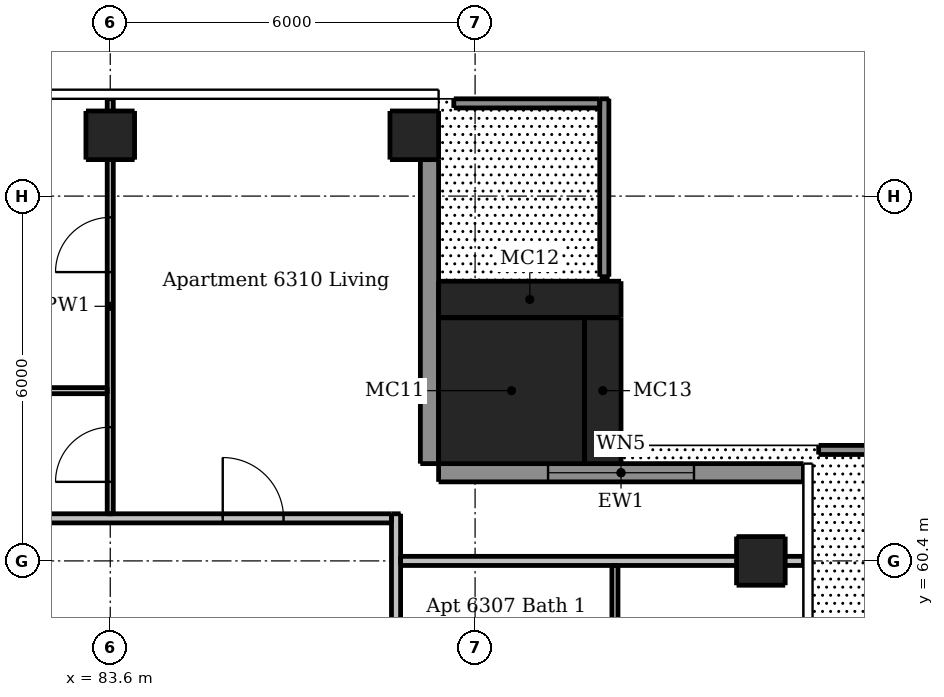
"""IFC4 building model, lengths in metres.
Left out: names, types, materials, properties, quantities, classifications, styles, units other than length and angle.
Written with IfcOpenShell. Run it as: python <this file> out.ifc"""

import sys

from ifc_helpers import new_model, si_unit, direction, frame, frame_2d, origin, origin_2d, place, context, subcontext, project, spatial, rectangle, extrude, element, fill, save


model = new_model("IFC4")
c1 = context("Model", 3, precision=1e-05, world=origin(), true_north=direction((0.0, 1.0)))
c2 = subcontext(c1, "Body", "Model", "MODEL_VIEW")
j1 = project(units=[si_unit("LENGTHUNIT", "METRE"), si_unit("PLANEANGLEUNIT", "RADIAN")], contexts=[c1])
p1 = place(None, origin())
s1 = spatial("IfcSite", under=j1, at=p1, CompositionType="ELEMENT")
p2 = place(p1, origin())
s2 = spatial("IfcBuilding", under=s1, at=p2, CompositionType="ELEMENT")
p3 = place(p2, frame((0.0, 0.0, 238.9)))
s3 = spatial("IfcBuildingStorey", under=s2, at=p3, CompositionType="ELEMENT", Elevation=238.9)
for number, where, z_axis, x_axis in (
    (1, (94.3, 60.4, 0.0), (0.0, 0.0, 1.0), (1.0, 0.0, 0.0)),
    (2, (83.6, 67.4, 0.0), (0.0, 0.0, 1.0), (1.0, 0.0, 0.0)),
    (3, (88.6, 67.4, 0.0), (0.0, 0.0, 1.0), (1.0, 0.0, 0.0)),
):
    element("IfcColumn", number, at=place(p3, frame(where, z_axis=z_axis, x_axis=x_axis)), inside=s3, PredefinedType="COLUMN", context=c2, shape_type="SweptSolid", body=[
        extrude(rectangle(XDim=0.8, YDim=0.8, at=origin_2d()), origin(), (0.0, 0.0, 1.0), 3.05),
    ])
p4 = place(p3, frame((90.5, 64.7, 0.0), z_axis=(0.0, 0.0, 1.0), x_axis=(1.0, 0.0, 0.0)))
e4 = element("IfcColumn", 4, at=p4, inside=s3, PredefinedType="COLUMN", context=c2, shape_type="SweptSolid", body=[
    extrude(rectangle(XDim=3.0, YDim=0.6, at=origin_2d()), origin(), (0.0, 0.0, 1.0), 2.4),
])
p5 = place(p3, frame((91.7, 63.2, 0.0), z_axis=(0.0, 0.0, 1.0), x_axis=(1.0, 0.0, 0.0)))
e5 = element("IfcColumn", 5, at=p5, inside=s3, PredefinedType="COLUMN", context=c2, shape_type="SweptSolid", body=[
    extrude(rectangle(XDim=0.6, YDim=2.4, at=origin_2d()), origin(), (0.0, 0.0, 1.0), 2.4),
])
p6 = place(p3, frame((90.2, 63.2, 0.0), z_axis=(0.0, 0.0, 1.0), x_axis=(1.0, 0.0, 0.0)))
e6 = element("IfcColumn", 6, at=p6, inside=s3, PredefinedType="COLUMN", context=c2, shape_type="SweptSolid", body=[
    extrude(rectangle(XDim=2.4, YDim=2.4, at=origin_2d()), origin(), (0.0, 0.0, 1.0), 3.3),
])
p7 = place(p3, frame((95.0, 61.85, 0.0), z_axis=(0.0, 0.0, 1.0), x_axis=(-1.0, 0.0, 0.0)))
e7 = element("IfcWall", 7, at=p7, inside=s3, PredefinedType="SOLIDWALL", context=c2, shape_type="SweptSolid", body=[
    extrude(rectangle(XDim=6.0, YDim=0.3, at=frame_2d((3.0, 0.0))), origin(), (0.0, 0.0, 1.0), 3.05),
])
p8 = place(p7, frame((1.8, 0.0, 0.15)))
e8 = element("IfcOpeningElement", 8, at=p8, cuts=e7, PredefinedType="OPENING", context=c2, shape_type="SweptSolid", body=[
    extrude(rectangle(XDim=2.4, YDim=2.1, at=frame_2d((1.2, 1.05))), frame((0.0, 0.16, 0.0), z_axis=(0.0, -1.0, 0.0), x_axis=(1.0, 0.0, 0.0)), (0.0, 0.0, 1.0), 0.32),
])
p9 = place(p3, frame((88.85, 62.0, 0.0), z_axis=(0.0, 0.0, 1.0), x_axis=(0.0, 1.0, 0.0)))
e9 = element("IfcWall", 9, at=p9, inside=s3, PredefinedType="SOLIDWALL", context=c2, shape_type="SweptSolid", body=[
    extrude(rectangle(XDim=5.0, YDim=0.3, at=frame_2d((2.5, 0.0))), origin(), (0.0, 0.0, 1.0), 3.05),
])
p10 = place(p3, frame((97.35, 62.225, 0.0), z_axis=(0.0, 0.0, 1.0), x_axis=(-1.0, 0.0, 0.0)))
e10 = element("IfcWall", 10, at=p10, inside=s3, PredefinedType="PARAPET", context=c2, shape_type="SweptSolid", body=[
    extrude(rectangle(XDim=2.1, YDim=0.15, at=frame_2d((1.05, 0.0))), origin(), (0.0, 0.0, 1.0), 1.1),
])
p11 = place(p3, frame((91.725, 65.074, 0.0), z_axis=(0.0, 0.0, 1.0), x_axis=(0.0, 1.0, 0.0)))
e11 = element("IfcWall", 11, at=p11, inside=s3, PredefinedType="PARAPET", context=c2, shape_type="SweptSolid", body=[
    extrude(rectangle(XDim=2.926, YDim=0.15, at=frame_2d((1.463, 0.0))), origin(), (0.0, 0.0, 1.0), 1.1),
])
p12 = place(p3, frame((91.65, 67.925, 0.0), z_axis=(0.0, 0.0, 1.0), x_axis=(-1.0, 0.0, 0.0)))
e12 = element("IfcWall", 12, at=p12, inside=s3, PredefinedType="PARAPET", context=c2, shape_type="SweptSolid", body=[
    extrude(rectangle(XDim=2.4, YDim=0.15, at=frame_2d((1.2, 0.0))), origin(), (0.0, 0.0, 1.0), 1.1),
])
p13 = place(p3, frame((83.6, 61.175, 0.0), z_axis=(0.0, 0.0, 1.0), x_axis=(0.0, 1.0, 0.0)))
e13 = element("IfcWall", 13, at=p13, inside=s3, PredefinedType="PARTITIONING", context=c2, shape_type="SweptSolid", body=[
    extrude(rectangle(XDim=6.825, YDim=0.1, at=frame_2d((3.413, 0.0))), origin(), (0.0, 0.0, 1.0), 2.516),
])
p14 = place(p13, frame((0.525, 0.0, 0.0)))
e14 = element("IfcOpeningElement", 14, at=p14, cuts=e13, PredefinedType="OPENING", context=c2, shape_type="SweptSolid", body=[
    extrude(rectangle(XDim=0.9, YDim=2.1, at=frame_2d((0.45, 1.05))), frame((0.0, 0.06, 0.0), z_axis=(0.0, -1.0, 0.0), x_axis=(1.0, 0.0, 0.0)), (0.0, 0.0, 1.0), 0.12),
])
p15 = place(p13, frame((3.975, 0.0, 0.0)))
e15 = element("IfcOpeningElement", 15, at=p15, cuts=e13, PredefinedType="OPENING", context=c2, shape_type="SweptSolid", body=[
    extrude(rectangle(XDim=0.9, YDim=2.1, at=frame_2d((0.45, 1.05))), frame((0.0, 0.06, 0.0), z_axis=(0.0, -1.0, 0.0), x_axis=(1.0, 0.0, 0.0)), (0.0, 0.0, 1.0), 0.12),
])
p16 = place(p3, frame((91.9, 58.25, 0.0), z_axis=(0.0, 0.0, 1.0), x_axis=(0.0, 1.0, 0.0)))
e16 = element("IfcWall", 16, at=p16, inside=s3, PredefinedType="PARTITIONING", context=c2, shape_type="SweptSolid", body=[
    extrude(rectangle(XDim=2.075, YDim=0.1, at=frame_2d((1.038, 0.0))), origin(), (0.0, 0.0, 1.0), 3.05),
])
p17 = place(p3, frame((83.55, 63.2, 0.0), z_axis=(0.0, 0.0, 1.0), x_axis=(-1.0, 0.0, 0.0)))
e17 = element("IfcWall", 17, at=p17, inside=s3, PredefinedType="PARTITIONING", context=c2, shape_type="SweptSolid", body=[
    extrude(rectangle(XDim=5.875, YDim=0.1, at=frame_2d((2.938, 0.0))), origin(), (0.0, 0.0, 1.0), 3.05),
])
p18 = place(p17, frame((3.75, 0.0, 0.0)))
e18 = element("IfcOpeningElement", 18, at=p18, cuts=e17, PredefinedType="OPENING", context=c2, shape_type="SweptSolid", body=[
    extrude(rectangle(XDim=0.8, YDim=2.1, at=frame_2d((0.4, 1.05))), frame((0.0, 0.06, 0.0), z_axis=(0.0, -1.0, 0.0), x_axis=(1.0, 0.0, 0.0)), (0.0, 0.0, 1.0), 0.12),
])
p19 = place(p3, frame((88.3, 61.175, 0.0), z_axis=(0.0, 0.0, 1.0), x_axis=(0.0, -1.0, 0.0)))
e19 = element("IfcWall", 19, at=p19, inside=s3, PredefinedType="PARTITIONING", context=c2, shape_type="SweptSolid", body=[
    extrude(rectangle(XDim=29.4, YDim=0.15, at=frame_2d((14.7, 0.0))), origin(), (0.0, 0.0, 1.0), 3.05),
])
p20 = place(p19, frame((26.625, 0.0, 0.0)))
e20 = element("IfcOpeningElement", 20, at=p20, cuts=e19, PredefinedType="OPENING", context=c2, shape_type="SweptSolid", body=[
    extrude(rectangle(XDim=1.0, YDim=2.1, at=frame_2d((0.5, 1.05))), frame((0.0, 0.085, 0.0), z_axis=(0.0, -1.0, 0.0), x_axis=(1.0, 0.0, 0.0)), (0.0, 0.0, 1.0), 0.17),
])
p21 = place(p19, frame((15.275, 0.0, 0.0)))
e21 = element("IfcOpeningElement", 21, at=p21, cuts=e19, PredefinedType="OPENING", context=c2, shape_type="SweptSolid", body=[
    extrude(rectangle(XDim=1.0, YDim=2.1, at=frame_2d((0.5, 1.05))), frame((0.0, 0.085, 0.0), z_axis=(0.0, -1.0, 0.0), x_axis=(1.0, 0.0, 0.0)), (0.0, 0.0, 1.0), 0.17),
])
p22 = place(p19, frame((9.275, 0.0, 0.0)))
e22 = element("IfcOpeningElement", 22, at=p22, cuts=e19, PredefinedType="OPENING", context=c2, shape_type="SweptSolid", body=[
    extrude(rectangle(XDim=1.0, YDim=2.1, at=frame_2d((0.5, 1.05))), frame((0.0, 0.085, 0.0), z_axis=(0.0, -1.0, 0.0), x_axis=(1.0, 0.0, 0.0)), (0.0, 0.0, 1.0), 0.17),
])
p23 = place(p19, frame((3.275, 0.0, 0.0)))
e23 = element("IfcOpeningElement", 23, at=p23, cuts=e19, PredefinedType="OPENING", context=c2, shape_type="SweptSolid", body=[
    extrude(rectangle(XDim=1.0, YDim=2.1, at=frame_2d((0.5, 1.05))), frame((0.0, 0.085, 0.0), z_axis=(0.0, -1.0, 0.0), x_axis=(1.0, 0.0, 0.0)), (0.0, 0.0, 1.0), 0.17),
])
p24 = place(p3, frame((58.975, 61.1, 0.0), z_axis=(0.0, 0.0, 1.0), x_axis=(1.0, 0.0, 0.0)))
e24 = element("IfcWall", 24, at=p24, inside=s3, PredefinedType="PARTITIONING", context=c2, shape_type="SweptSolid", body=[
    extrude(rectangle(XDim=29.25, YDim=0.15, at=frame_2d((14.625, 0.0))), origin(), (0.0, 0.0, 1.0), 3.05),
])
p25 = place(p24, frame((3.125, 0.0, 0.0)))
e25 = element("IfcOpeningElement", 25, at=p25, cuts=e24, PredefinedType="OPENING", context=c2, shape_type="SweptSolid", body=[
    extrude(rectangle(XDim=1.0, YDim=2.1, at=frame_2d((0.5, 1.05))), frame((0.0, 0.085, 0.0), z_axis=(0.0, -1.0, 0.0), x_axis=(1.0, 0.0, 0.0)), (0.0, 0.0, 1.0), 0.17),
])
p26 = place(p24, frame((13.925, 0.0, 0.0)))
e26 = element("IfcOpeningElement", 26, at=p26, cuts=e24, PredefinedType="OPENING", context=c2, shape_type="SweptSolid", body=[
    extrude(rectangle(XDim=1.0, YDim=2.1, at=frame_2d((0.5, 1.05))), frame((0.0, 0.085, 0.0), z_axis=(0.0, -1.0, 0.0), x_axis=(1.0, 0.0, 0.0)), (0.0, 0.0, 1.0), 0.17),
])
p27 = place(p24, frame((26.475, 0.0, 0.0)))
e27 = element("IfcOpeningElement", 27, at=p27, cuts=e24, PredefinedType="OPENING", context=c2, shape_type="SweptSolid", body=[
    extrude(rectangle(XDim=1.0, YDim=2.1, at=frame_2d((0.5, 1.05))), frame((0.0, 0.085, 0.0), z_axis=(0.0, -1.0, 0.0), x_axis=(1.0, 0.0, 0.0)), (0.0, 0.0, 1.0), 0.17),
])
p28 = place(p3, frame((88.375, 60.4, 0.0), z_axis=(0.0, 0.0, 1.0), x_axis=(1.0, 0.0, 0.0)))
e28 = element("IfcWall", 28, at=p28, inside=s3, PredefinedType="PARTITIONING", context=c2, shape_type="SweptSolid", body=[
    extrude(rectangle(XDim=6.625, YDim=0.15, at=frame_2d((3.312, 0.0))), origin(), (0.0, 0.0, 1.0), 2.647),
])
p29 = place(p8, origin())
e29 = element("IfcWindow", 29, at=p29, inside=s3, PartitioningType="DOUBLE_PANEL_VERTICAL", PredefinedType="WINDOW", context=c2, shape_type="SweptSolid", body=[
    extrude(rectangle(XDim=2.4, YDim=2.1, at=frame_2d((1.2, 1.05))), frame((0.0, 0.03, 0.0), z_axis=(0.0, -1.0, 0.0), x_axis=(1.0, 0.0, 0.0)), (0.0, 0.0, 1.0), 0.06),
])
fill(e8, e29)
p30 = place(p27, origin())
e30 = element("IfcDoor", 30, at=p30, inside=s3, OperationType="SINGLE_SWING_LEFT", PredefinedType="DOOR", context=c2, shape_type="SweptSolid", body=[
    extrude(rectangle(XDim=1.0, YDim=2.1, at=frame_2d((0.5, 1.05))), frame((0.0, 0.025, 0.0), z_axis=(0.0, -1.0, 0.0), x_axis=(1.0, 0.0, 0.0)), (0.0, 0.0, 1.0), 0.05),
])
fill(e27, e30)
p31 = place(p14, origin())
e31 = element("IfcDoor", 31, at=p31, inside=s3, OperationType="SINGLE_SWING_LEFT", PredefinedType="DOOR", context=c2, shape_type="SweptSolid", body=[
    extrude(rectangle(XDim=0.9, YDim=2.1, at=frame_2d((0.45, 1.05))), frame((0.0, 0.025, 0.0), z_axis=(0.0, -1.0, 0.0), x_axis=(1.0, 0.0, 0.0)), (0.0, 0.0, 1.0), 0.05),
])
fill(e14, e31)
p32 = place(p15, origin())
e32 = element("IfcDoor", 32, at=p32, inside=s3, OperationType="SINGLE_SWING_LEFT", PredefinedType="DOOR", context=c2, shape_type="SweptSolid", body=[
    extrude(rectangle(XDim=0.9, YDim=2.1, at=frame_2d((0.45, 1.05))), frame((0.0, 0.025, 0.0), z_axis=(0.0, -1.0, 0.0), x_axis=(1.0, 0.0, 0.0)), (0.0, 0.0, 1.0), 0.05),
])
fill(e15, e32)
save(model, sys.argv[1])
